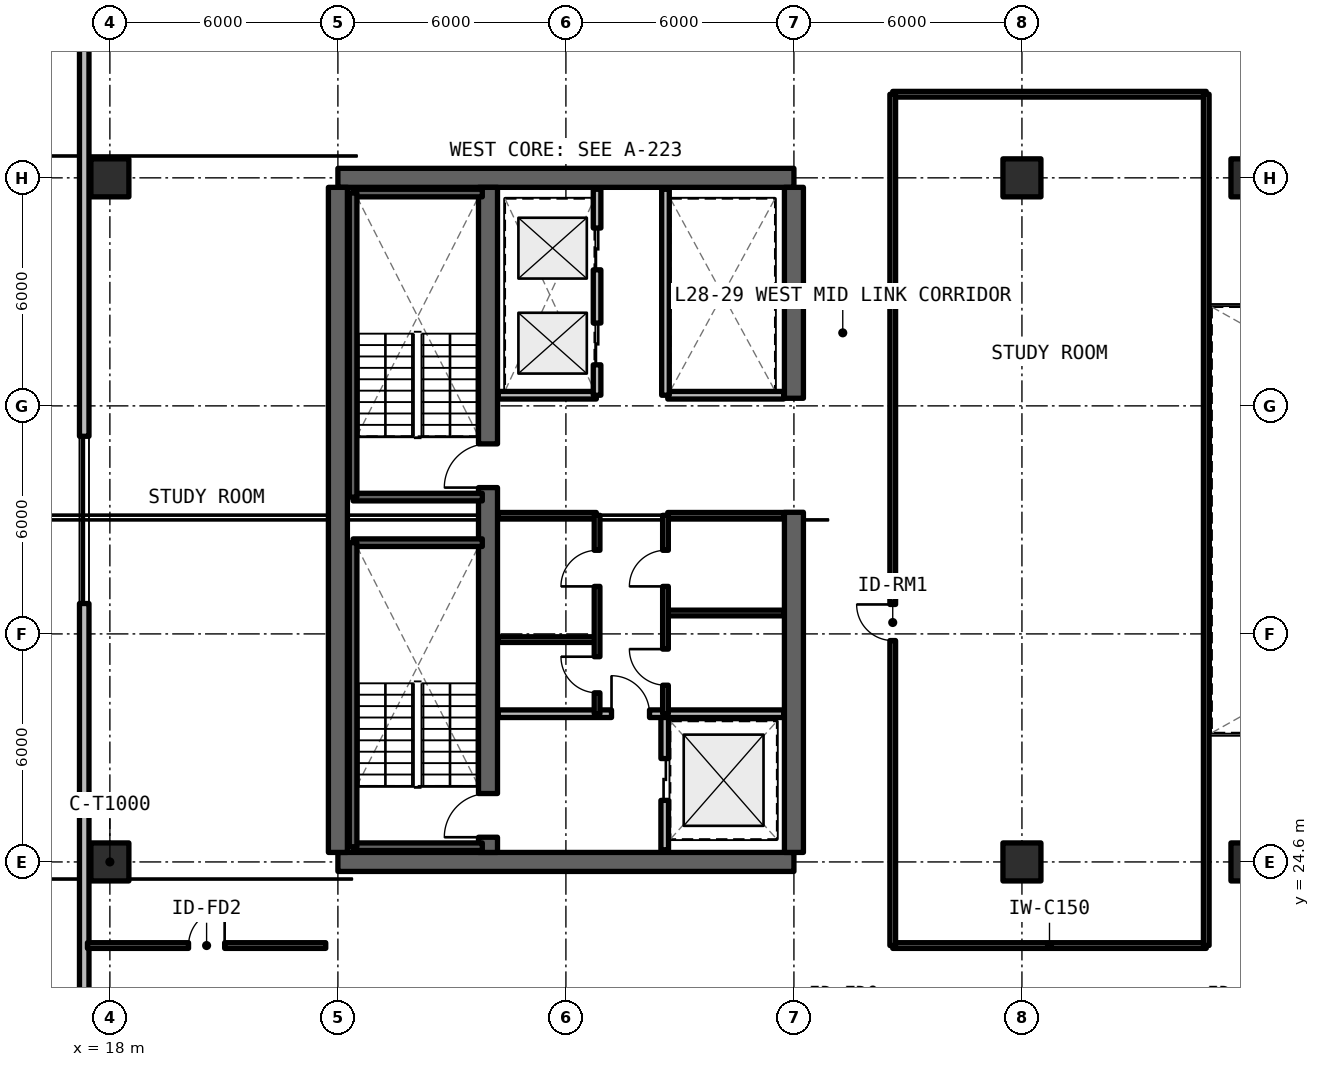
"""IFC4 building model, lengths in metres.
Left out: names, types, materials, properties, quantities, classifications, styles, units other than length and angle.
Written with IfcOpenShell. Run it as: python <this file> out.ifc"""

import sys

from ifc_helpers import new_model, si_unit, direction, frame, frame_2d, origin, origin_2d, place, context, subcontext, project, spatial, rectangle, extrude, element, fill, save


model = new_model("IFC4")
c1 = context("Model", 3, precision=1e-05, world=origin(), true_north=direction((0.0, 1.0)))
c2 = subcontext(c1, "Body", "Model", "MODEL_VIEW")
j1 = project(units=[si_unit("LENGTHUNIT", "METRE"), si_unit("PLANEANGLEUNIT", "RADIAN")], contexts=[c1])
p1 = place(None, origin())
s1 = spatial("IfcSite", under=j1, at=p1, CompositionType="ELEMENT")
p2 = place(p1, origin())
s2 = spatial("IfcBuilding", under=s1, at=p2, CompositionType="ELEMENT")
p3 = place(p2, frame((0.0, 0.0, 101.97)))
s3 = spatial("IfcBuildingStorey", under=s2, at=p3, CompositionType="ELEMENT", Elevation=101.97)
for number, where, z_axis, x_axis in (
    (1, (24.0, 24.6, 0.0), (0.0, 0.0, 1.0), (1.0, 0.0, 0.0)),
    (2, (36.0, 42.6, 0.0), (0.0, 0.0, 1.0), (-1.0, 0.0, 0.0)),
):
    element("IfcWall", number, at=place(p3, frame(where, z_axis=z_axis, x_axis=x_axis)), inside=s3, PredefinedType="SHEAR", context=c2, shape_type="SweptSolid", body=[
        extrude(rectangle(XDim=12.0, YDim=0.5, at=frame_2d((6.0, 0.0))), origin(), (0.0, 0.0, 1.0), 3.3),
    ])
p4 = place(p3, frame((24.0, 24.85, 0.0), z_axis=(0.0, 0.0, 1.0), x_axis=(0.0, 1.0, 0.0)))
e3 = element("IfcWall", 3, at=p4, inside=s3, PredefinedType="SHEAR", context=c2, shape_type="SweptSolid", body=[
    extrude(rectangle(XDim=17.5, YDim=0.5, at=frame_2d((8.75, 0.0))), origin(), (0.0, 0.0, 1.0), 3.3),
])
p5 = place(p3, frame((36.0, 24.85, 0.0), z_axis=(0.0, 0.0, 1.0), x_axis=(0.0, 1.0, 0.0)))
e4 = element("IfcWall", 4, at=p5, inside=s3, PredefinedType="SHEAR", context=c2, shape_type="SweptSolid", body=[
    extrude(rectangle(XDim=8.95, YDim=0.5, at=frame_2d((4.475, 0.0))), origin(), (0.0, 0.0, 1.0), 3.3),
])
p6 = place(p3, frame((36.0, 36.8, 0.0), z_axis=(0.0, 0.0, 1.0), x_axis=(0.0, 1.0, 0.0)))
e5 = element("IfcWall", 5, at=p6, inside=s3, PredefinedType="SHEAR", context=c2, shape_type="SweptSolid", body=[
    extrude(rectangle(XDim=5.55, YDim=0.5, at=frame_2d((2.775, 0.0))), origin(), (0.0, 0.0, 1.0), 3.3),
])
p7 = place(p3, frame((27.95, 24.85, 0.0), z_axis=(0.0, 0.0, 1.0), x_axis=(0.0, 1.0, 0.0)))
e6 = element("IfcWall", 6, at=p7, inside=s3, PredefinedType="SHEAR", context=c2, shape_type="SweptSolid", body=[
    extrude(rectangle(XDim=17.5, YDim=0.5, at=frame_2d((8.75, 0.0))), origin(), (0.0, 0.0, 1.0), 3.3),
])
p8 = place(p7, frame((0.4, 0.0, 0.0)))
e7 = element("IfcOpeningElement", 7, at=p8, cuts=e6, PredefinedType="OPENING", context=c2, shape_type="SweptSolid", body=[
    extrude(rectangle(XDim=1.15, YDim=2.15, at=frame_2d((0.575, 1.075))), frame((0.0, 0.26, 0.0), z_axis=(0.0, -1.0, 0.0), x_axis=(1.0, 0.0, 0.0)), (0.0, 0.0, 1.0), 0.52),
])
p9 = place(p7, frame((9.6, 0.0, 0.0)))
e8 = element("IfcOpeningElement", 8, at=p9, cuts=e6, PredefinedType="OPENING", context=c2, shape_type="SweptSolid", body=[
    extrude(rectangle(XDim=1.15, YDim=2.15, at=frame_2d((0.575, 1.075))), frame((0.0, 0.26, 0.0), z_axis=(0.0, -1.0, 0.0), x_axis=(1.0, 0.0, 0.0)), (0.0, 0.0, 1.0), 0.52),
])
for number, where, z_axis, x_axis in (
    (9, (18.0, 24.6, 0.0), (0.0, 0.0, 1.0), (1.0, 0.0, 0.0)),
    (10, (18.0, 42.6, 0.0), (0.0, 0.0, 1.0), (1.0, 0.0, 0.0)),
    (11, (42.0, 24.6, 0.0), (0.0, 0.0, 1.0), (1.0, 0.0, 0.0)),
    (12, (42.0, 42.6, 0.0), (0.0, 0.0, 1.0), (1.0, 0.0, 0.0)),
    (13, (48.0, 24.6, 0.0), (0.0, 0.0, 1.0), (1.0, 0.0, 0.0)),
    (14, (48.0, 42.6, 0.0), (0.0, 0.0, 1.0), (1.0, 0.0, 0.0)),
):
    element("IfcColumn", number, at=place(p3, frame(where, z_axis=z_axis, x_axis=x_axis)), inside=s3, PredefinedType="COLUMN", context=c2, shape_type="SweptSolid", body=[
        extrude(rectangle(XDim=1.0, YDim=1.0, at=origin_2d()), origin(), (0.0, 0.0, 1.0), 3.3),
    ])
p10 = place(p3, frame((17.325, 53.348, 0.0), z_axis=(0.0, 0.0, 1.0), x_axis=(0.0, -1.0, 0.0)))
e15 = element("IfcWall", 15, at=p10, inside=s3, PredefinedType="SOLIDWALL", context=c2, shape_type="SweptSolid", body=[
    extrude(rectangle(XDim=39.496, YDim=0.25, at=frame_2d((19.748, 0.0))), origin(), (0.0, 0.0, 1.0), 3.08),
])
p11 = place(p10, frame((36.448, 0.0, 0.0)))
e16 = element("IfcOpeningElement", 16, at=p11, cuts=e15, PredefinedType="OPENING", context=c2, shape_type="SweptSolid", body=[
    extrude(rectangle(XDim=1.1, YDim=2.15, at=frame_2d((0.55, 1.075))), frame((0.0, 0.135, 0.0), z_axis=(0.0, -1.0, 0.0), x_axis=(1.0, 0.0, 0.0)), (0.0, 0.0, 1.0), 0.27),
])
p12 = place(p10, frame((1.698, 0.0, 0.0)))
e17 = element("IfcOpeningElement", 17, at=p12, cuts=e15, PredefinedType="OPENING", context=c2, shape_type="SweptSolid", body=[
    extrude(rectangle(XDim=1.1, YDim=2.15, at=frame_2d((0.55, 1.075))), frame((0.0, 0.135, 0.0), z_axis=(0.0, -1.0, 0.0), x_axis=(1.0, 0.0, 0.0)), (0.0, 0.0, 1.0), 0.27),
])
p13 = place(p10, frame((17.548, 0.0, 0.78)))
e18 = element("IfcOpeningElement", 18, at=p13, cuts=e15, PredefinedType="OPENING", context=c2, shape_type="SweptSolid", body=[
    extrude(rectangle(XDim=4.4, YDim=1.66, at=frame_2d((2.2, 0.83))), frame((0.0, 0.135, 0.0), z_axis=(0.0, -1.0, 0.0), x_axis=(1.0, 0.0, 0.0)), (0.0, 0.0, 1.0), 0.27),
])
p14 = place(p3, frame((32.6, 24.92, 0.0), z_axis=(0.0, 0.0, 1.0), x_axis=(0.0, 1.0, 0.0)))
e19 = element("IfcWall", 19, at=p14, inside=s3, PredefinedType="SOLIDWALL", context=c2, shape_type="SweptSolid", body=[
    extrude(rectangle(XDim=3.58, YDim=0.2, at=frame_2d((1.79, 0.0))), origin(), (0.0, 0.0, 1.0), 2.35),
])
p15 = place(p14, frame((1.3, 0.0, 0.0)))
e20 = element("IfcOpeningElement", 20, at=p15, cuts=e19, PredefinedType="OPENING", context=c2, shape_type="SweptSolid", body=[
    extrude(rectangle(XDim=1.1, YDim=2.2, at=frame_2d((0.55, 1.1))), frame((0.0, 0.11, 0.0), z_axis=(0.0, -1.0, 0.0), x_axis=(1.0, 0.0, 0.0)), (0.0, 0.0, 1.0), 0.22),
])
p16 = place(p3, frame((28.22, 28.5, 0.0), z_axis=(0.0, 0.0, 1.0), x_axis=(1.0, 0.0, 0.0)))
e21 = element("IfcWall", 21, at=p16, inside=s3, PredefinedType="SOLIDWALL", context=c2, shape_type="SweptSolid", body=[
    extrude(rectangle(XDim=7.51, YDim=0.2, at=frame_2d((3.755, 0.0))), origin(), (0.0, 0.0, 1.0), 2.35),
])
p17 = place(p16, frame((2.98, 0.0, 0.0)))
e22 = element("IfcOpeningElement", 22, at=p17, cuts=e21, PredefinedType="OPENING", context=c2, shape_type="SweptSolid", body=[
    extrude(rectangle(XDim=1.0, YDim=2.15, at=frame_2d((0.5, 1.075))), frame((0.0, 0.11, 0.0), z_axis=(0.0, -1.0, 0.0), x_axis=(1.0, 0.0, 0.0)), (0.0, 0.0, 1.0), 0.22),
])
for number, where, z_axis, x_axis in (
    (23, (28.22, 30.45, 0.0), (0.0, 0.0, 1.0), (1.0, 0.0, 0.0)),
    (24, (28.22, 33.72, 0.0), (0.0, 0.0, 1.0), (1.0, 0.0, 0.0)),
):
    element("IfcWall", number, at=place(p3, frame(where, z_axis=z_axis, x_axis=x_axis)), inside=s3, PredefinedType="SOLIDWALL", context=c2, shape_type="SweptSolid", body=[
        extrude(rectangle(XDim=2.58, YDim=0.15, at=frame_2d((1.29, 0.0))), origin(), (0.0, 0.0, 1.0), 2.35),
    ])
p18 = place(p3, frame((30.82, 28.5, 0.0), z_axis=(0.0, 0.0, 1.0), x_axis=(0.0, 1.0, 0.0)))
e25 = element("IfcWall", 25, at=p18, inside=s3, PredefinedType="SOLIDWALL", context=c2, shape_type="SweptSolid", body=[
    extrude(rectangle(XDim=5.22, YDim=0.15, at=frame_2d((2.61, 0.0))), origin(), (0.0, 0.0, 1.0), 2.35),
])
p19 = place(p18, frame((0.55, 0.0, 0.0)))
e26 = element("IfcOpeningElement", 26, at=p19, cuts=e25, PredefinedType="OPENING", context=c2, shape_type="SweptSolid", body=[
    extrude(rectangle(XDim=0.95, YDim=2.15, at=frame_2d((0.475, 1.075))), frame((0.0, 0.085, 0.0), z_axis=(0.0, -1.0, 0.0), x_axis=(1.0, 0.0, 0.0)), (0.0, 0.0, 1.0), 0.17),
])
p20 = place(p18, frame((3.35, 0.0, 0.0)))
e27 = element("IfcOpeningElement", 27, at=p20, cuts=e25, PredefinedType="OPENING", context=c2, shape_type="SweptSolid", body=[
    extrude(rectangle(XDim=0.95, YDim=2.15, at=frame_2d((0.475, 1.075))), frame((0.0, 0.085, 0.0), z_axis=(0.0, -1.0, 0.0), x_axis=(1.0, 0.0, 0.0)), (0.0, 0.0, 1.0), 0.17),
])
for number, where, z_axis, x_axis in (
    (28, (32.68, 31.15, 0.0), (0.0, 0.0, 1.0), (1.0, 0.0, 0.0)),
    (29, (32.68, 33.72, 0.0), (0.0, 0.0, 1.0), (1.0, 0.0, 0.0)),
):
    element("IfcWall", number, at=place(p3, frame(where, z_axis=z_axis, x_axis=x_axis)), inside=s3, PredefinedType="SOLIDWALL", context=c2, shape_type="SweptSolid", body=[
        extrude(rectangle(XDim=3.05, YDim=0.15, at=frame_2d((1.525, 0.0))), origin(), (0.0, 0.0, 1.0), 2.35),
    ])
p21 = place(p3, frame((32.62, 28.5, 0.0), z_axis=(0.0, 0.0, 1.0), x_axis=(0.0, 1.0, 0.0)))
e30 = element("IfcWall", 30, at=p21, inside=s3, PredefinedType="SOLIDWALL", context=c2, shape_type="SweptSolid", body=[
    extrude(rectangle(XDim=5.22, YDim=0.15, at=frame_2d((2.61, 0.0))), origin(), (0.0, 0.0, 1.0), 2.35),
])
p22 = place(p21, frame((0.75, 0.0, 0.0)))
e31 = element("IfcOpeningElement", 31, at=p22, cuts=e30, PredefinedType="OPENING", context=c2, shape_type="SweptSolid", body=[
    extrude(rectangle(XDim=0.95, YDim=2.15, at=frame_2d((0.475, 1.075))), frame((0.0, 0.085, 0.0), z_axis=(0.0, -1.0, 0.0), x_axis=(1.0, 0.0, 0.0)), (0.0, 0.0, 1.0), 0.17),
])
p23 = place(p21, frame((3.35, 0.0, 0.0)))
e32 = element("IfcOpeningElement", 32, at=p23, cuts=e30, PredefinedType="OPENING", context=c2, shape_type="SweptSolid", body=[
    extrude(rectangle(XDim=0.95, YDim=2.15, at=frame_2d((0.475, 1.075))), frame((0.0, 0.085, 0.0), z_axis=(0.0, -1.0, 0.0), x_axis=(1.0, 0.0, 0.0)), (0.0, 0.0, 1.0), 0.17),
])
p24 = place(p3, frame((28.22, 36.88, 0.0), z_axis=(0.0, 0.0, 1.0), x_axis=(1.0, 0.0, 0.0)))
e33 = element("IfcWall", 33, at=p24, inside=s3, PredefinedType="SOLIDWALL", context=c2, shape_type="SweptSolid", body=[
    extrude(rectangle(XDim=2.58, YDim=0.2, at=frame_2d((1.29, 0.0))), origin(), (0.0, 0.0, 1.0), 2.35),
])
p25 = place(p3, frame((30.82, 36.88, 0.0), z_axis=(0.0, 0.0, 1.0), x_axis=(0.0, 1.0, 0.0)))
e34 = element("IfcWall", 34, at=p25, inside=s3, PredefinedType="SOLIDWALL", context=c2, shape_type="SweptSolid", body=[
    extrude(rectangle(XDim=5.42, YDim=0.2, at=frame_2d((2.71, 0.0))), origin(), (0.0, 0.0, 1.0), 2.35),
])
p26 = place(p25, frame((0.8, 0.0, 0.0)))
e35 = element("IfcOpeningElement", 35, at=p26, cuts=e34, PredefinedType="OPENING", context=c2, shape_type="SweptSolid", body=[
    extrude(rectangle(XDim=1.1, YDim=2.2, at=frame_2d((0.55, 1.1))), frame((0.0, 0.11, 0.0), z_axis=(0.0, -1.0, 0.0), x_axis=(1.0, 0.0, 0.0)), (0.0, 0.0, 1.0), 0.22),
])
p27 = place(p25, frame((3.3, 0.0, 0.0)))
e36 = element("IfcOpeningElement", 36, at=p27, cuts=e34, PredefinedType="OPENING", context=c2, shape_type="SweptSolid", body=[
    extrude(rectangle(XDim=1.1, YDim=2.2, at=frame_2d((0.55, 1.1))), frame((0.0, 0.11, 0.0), z_axis=(0.0, -1.0, 0.0), x_axis=(1.0, 0.0, 0.0)), (0.0, 0.0, 1.0), 0.22),
])
p28 = place(p3, frame((32.68, 36.88, 0.0), z_axis=(0.0, 0.0, 1.0), x_axis=(1.0, 0.0, 0.0)))
e37 = element("IfcWall", 37, at=p28, inside=s3, PredefinedType="SOLIDWALL", context=c2, shape_type="SweptSolid", body=[
    extrude(rectangle(XDim=3.05, YDim=0.2, at=frame_2d((1.525, 0.0))), origin(), (0.0, 0.0, 1.0), 2.35),
])
p29 = place(p3, frame((32.62, 36.88, 0.0), z_axis=(0.0, 0.0, 1.0), x_axis=(0.0, 1.0, 0.0)))
e38 = element("IfcWall", 38, at=p29, inside=s3, PredefinedType="SOLIDWALL", context=c2, shape_type="SweptSolid", body=[
    extrude(rectangle(XDim=5.42, YDim=0.2, at=frame_2d((2.71, 0.0))), origin(), (0.0, 0.0, 1.0), 2.35),
])
for number, where, z_axis, x_axis in (
    (39, (38.6, 22.4, 0.0), (0.0, 0.0, 1.0), (1.0, 0.0, 0.0)),
    (40, (38.6, 44.8, 0.0), (0.0, 0.0, 1.0), (1.0, 0.0, 0.0)),
):
    element("IfcWall", number, at=place(p3, frame(where, z_axis=z_axis, x_axis=x_axis)), inside=s3, PredefinedType="SOLIDWALL", context=c2, shape_type="SweptSolid", body=[
        extrude(rectangle(XDim=8.25, YDim=0.15, at=frame_2d((4.125, 0.0))), origin(), (0.0, 0.0, 1.0), 2.35),
    ])
p30 = place(p3, frame((38.6, 22.4, 0.0), z_axis=(0.0, 0.0, 1.0), x_axis=(0.0, 1.0, 0.0)))
e41 = element("IfcWall", 41, at=p30, inside=s3, PredefinedType="SOLIDWALL", context=c2, shape_type="SweptSolid", body=[
    extrude(rectangle(XDim=22.4, YDim=0.15, at=frame_2d((11.2, 0.0))), origin(), (0.0, 0.0, 1.0), 2.35),
])
p31 = place(p30, frame((8.025, 0.0, 0.0)))
e42 = element("IfcOpeningElement", 42, at=p31, cuts=e41, PredefinedType="OPENING", context=c2, shape_type="SweptSolid", body=[
    extrude(rectangle(XDim=0.95, YDim=2.15, at=frame_2d((0.475, 1.075))), frame((0.0, 0.085, 0.0), z_axis=(0.0, -1.0, 0.0), x_axis=(1.0, 0.0, 0.0)), (0.0, 0.0, 1.0), 0.17),
])
p32 = place(p3, frame((46.85, 22.4, 0.0), z_axis=(0.0, 0.0, 1.0), x_axis=(0.0, 1.0, 0.0)))
e43 = element("IfcWall", 43, at=p32, inside=s3, PredefinedType="SOLIDWALL", context=c2, shape_type="SweptSolid", body=[
    extrude(rectangle(XDim=22.4, YDim=0.15, at=frame_2d((11.2, 0.0))), origin(), (0.0, 0.0, 1.0), 2.35),
])
p33 = place(p3, frame((17.41, 22.4, 0.0), z_axis=(0.0, 0.0, 1.0), x_axis=(1.0, 0.0, 0.0)))
e44 = element("IfcWall", 44, at=p33, inside=s3, PredefinedType="SOLIDWALL", context=c2, shape_type="SweptSolid", body=[
    extrude(rectangle(XDim=6.27, YDim=0.15, at=frame_2d((3.135, 0.0))), origin(), (0.0, 0.0, 1.0), 2.35),
])
p34 = place(p33, frame((2.66, 0.0, 0.0)))
e45 = element("IfcOpeningElement", 45, at=p34, cuts=e44, PredefinedType="OPENING", context=c2, shape_type="SweptSolid", body=[
    extrude(rectangle(XDim=0.95, YDim=2.15, at=frame_2d((0.475, 1.075))), frame((0.0, 0.085, 0.0), z_axis=(0.0, -1.0, 0.0), x_axis=(1.0, 0.0, 0.0)), (0.0, 0.0, 1.0), 0.17),
])
for number, where, z_axis, x_axis in (
    (46, (24.4, 25.0, 0.0), (0.0, 0.0, 1.0), (1.0, 0.0, 0.0)),
    (47, (27.8, 33.0, 0.0), (0.0, 0.0, 1.0), (-1.0, 0.0, 0.0)),
):
    element("IfcWall", number, at=place(p3, frame(where, z_axis=z_axis, x_axis=x_axis)), inside=s3, PredefinedType="SOLIDWALL", context=c2, shape_type="SweptSolid", body=[
        extrude(rectangle(XDim=3.4, YDim=0.2, at=frame_2d((1.7, 0.0))), origin(), (0.0, 0.0, 1.0), 3.3),
    ])
p35 = place(p3, frame((24.4, 33.0, 0.0), z_axis=(0.0, 0.0, 1.0), x_axis=(0.0, -1.0, 0.0)))
e48 = element("IfcWall", 48, at=p35, inside=s3, PredefinedType="SOLIDWALL", context=c2, shape_type="SweptSolid", body=[
    extrude(rectangle(XDim=8.0, YDim=0.2, at=frame_2d((4.0, 0.0))), origin(), (0.0, 0.0, 1.0), 3.3),
])
for number, where, z_axis, x_axis in (
    (49, (24.4, 34.2, 0.0), (0.0, 0.0, 1.0), (1.0, 0.0, 0.0)),
    (50, (27.8, 42.2, 0.0), (0.0, 0.0, 1.0), (-1.0, 0.0, 0.0)),
):
    element("IfcWall", number, at=place(p3, frame(where, z_axis=z_axis, x_axis=x_axis)), inside=s3, PredefinedType="SOLIDWALL", context=c2, shape_type="SweptSolid", body=[
        extrude(rectangle(XDim=3.4, YDim=0.2, at=frame_2d((1.7, 0.0))), origin(), (0.0, 0.0, 1.0), 3.3),
    ])
p36 = place(p3, frame((24.4, 42.2, 0.0), z_axis=(0.0, 0.0, 1.0), x_axis=(0.0, -1.0, 0.0)))
e51 = element("IfcWall", 51, at=p36, inside=s3, PredefinedType="SOLIDWALL", context=c2, shape_type="SweptSolid", body=[
    extrude(rectangle(XDim=8.0, YDim=0.2, at=frame_2d((4.0, 0.0))), origin(), (0.0, 0.0, 1.0), 3.3),
])
p37 = place(p13, origin())
e52 = element("IfcWindow", 52, at=p37, inside=s3, PartitioningType="SINGLE_PANEL", PredefinedType="WINDOW", context=c2, shape_type="SweptSolid", body=[
    extrude(rectangle(XDim=4.4, YDim=1.66, at=frame_2d((2.2, 0.83))), frame((0.0, 0.03, 0.0), z_axis=(0.0, -1.0, 0.0), x_axis=(1.0, 0.0, 0.0)), (0.0, 0.0, 1.0), 0.06),
])
fill(e18, e52)
p38 = place(p15, origin())
e53 = element("IfcDoor", 53, at=p38, inside=s3, OperationType="SLIDING_TO_LEFT", PredefinedType="DOOR", context=c2, shape_type="SweptSolid", body=[
    extrude(rectangle(XDim=1.1, YDim=2.2, at=frame_2d((0.55, 1.1))), frame((0.0, 0.025, 0.0), z_axis=(0.0, -1.0, 0.0), x_axis=(1.0, 0.0, 0.0)), (0.0, 0.0, 1.0), 0.05),
])
fill(e20, e53)
p39 = place(p17, origin())
e54 = element("IfcDoor", 54, at=p39, inside=s3, OperationType="SINGLE_SWING_LEFT", PredefinedType="DOOR", context=c2, shape_type="SweptSolid", body=[
    extrude(rectangle(XDim=1.0, YDim=2.15, at=frame_2d((0.5, 1.075))), frame((0.0, 0.025, 0.0), z_axis=(0.0, -1.0, 0.0), x_axis=(1.0, 0.0, 0.0)), (0.0, 0.0, 1.0), 0.05),
])
fill(e22, e54)
p40 = place(p19, origin())
e55 = element("IfcDoor", 55, at=p40, inside=s3, OperationType="SINGLE_SWING_RIGHT", PredefinedType="DOOR", context=c2, shape_type="SweptSolid", body=[
    extrude(rectangle(XDim=0.95, YDim=2.15, at=frame_2d((0.475, 1.075))), frame((0.0, 0.025, 0.0), z_axis=(0.0, -1.0, 0.0), x_axis=(1.0, 0.0, 0.0)), (0.0, 0.0, 1.0), 0.05),
])
fill(e26, e55)
p41 = place(p20, origin())
e56 = element("IfcDoor", 56, at=p41, inside=s3, OperationType="SINGLE_SWING_LEFT", PredefinedType="DOOR", context=c2, shape_type="SweptSolid", body=[
    extrude(rectangle(XDim=0.95, YDim=2.15, at=frame_2d((0.475, 1.075))), frame((0.0, 0.025, 0.0), z_axis=(0.0, -1.0, 0.0), x_axis=(1.0, 0.0, 0.0)), (0.0, 0.0, 1.0), 0.05),
])
fill(e27, e56)
p42 = place(p22, origin())
e57 = element("IfcDoor", 57, at=p42, inside=s3, OperationType="SINGLE_SWING_RIGHT", PredefinedType="DOOR", context=c2, shape_type="SweptSolid", body=[
    extrude(rectangle(XDim=0.95, YDim=2.15, at=frame_2d((0.475, 1.075))), frame((0.0, 0.025, 0.0), z_axis=(0.0, -1.0, 0.0), x_axis=(1.0, 0.0, 0.0)), (0.0, 0.0, 1.0), 0.05),
])
fill(e31, e57)
p43 = place(p23, origin())
e58 = element("IfcDoor", 58, at=p43, inside=s3, OperationType="SINGLE_SWING_LEFT", PredefinedType="DOOR", context=c2, shape_type="SweptSolid", body=[
    extrude(rectangle(XDim=0.95, YDim=2.15, at=frame_2d((0.475, 1.075))), frame((0.0, 0.025, 0.0), z_axis=(0.0, -1.0, 0.0), x_axis=(1.0, 0.0, 0.0)), (0.0, 0.0, 1.0), 0.05),
])
fill(e32, e58)
p44 = place(p26, origin())
e59 = element("IfcDoor", 59, at=p44, inside=s3, OperationType="SLIDING_TO_LEFT", PredefinedType="DOOR", context=c2, shape_type="SweptSolid", body=[
    extrude(rectangle(XDim=1.1, YDim=2.2, at=frame_2d((0.55, 1.1))), frame((0.0, 0.025, 0.0), z_axis=(0.0, -1.0, 0.0), x_axis=(1.0, 0.0, 0.0)), (0.0, 0.0, 1.0), 0.05),
])
fill(e35, e59)
p45 = place(p27, origin())
e60 = element("IfcDoor", 60, at=p45, inside=s3, OperationType="SLIDING_TO_RIGHT", PredefinedType="DOOR", context=c2, shape_type="SweptSolid", body=[
    extrude(rectangle(XDim=1.1, YDim=2.2, at=frame_2d((0.55, 1.1))), frame((0.0, 0.025, 0.0), z_axis=(0.0, -1.0, 0.0), x_axis=(1.0, 0.0, 0.0)), (0.0, 0.0, 1.0), 0.05),
])
fill(e36, e60)
p46 = place(p31, origin())
e61 = element("IfcDoor", 61, at=p46, inside=s3, OperationType="SINGLE_SWING_RIGHT", PredefinedType="DOOR", context=c2, shape_type="SweptSolid", body=[
    extrude(rectangle(XDim=0.95, YDim=2.15, at=frame_2d((0.475, 1.075))), frame((0.0, 0.025, 0.0), z_axis=(0.0, -1.0, 0.0), x_axis=(1.0, 0.0, 0.0)), (0.0, 0.0, 1.0), 0.05),
])
fill(e42, e61)
p47 = place(p34, origin())
e62 = element("IfcDoor", 62, at=p47, inside=s3, OperationType="SINGLE_SWING_RIGHT", PredefinedType="DOOR", context=c2, shape_type="SweptSolid", body=[
    extrude(rectangle(XDim=0.95, YDim=2.15, at=frame_2d((0.475, 1.075))), frame((0.0, 0.025, 0.0), z_axis=(0.0, -1.0, 0.0), x_axis=(1.0, 0.0, 0.0)), (0.0, 0.0, 1.0), 0.05),
])
fill(e45, e62)
p48 = place(p8, origin())
e63 = element("IfcDoor", 63, at=p48, inside=s3, OperationType="SINGLE_SWING_LEFT", PredefinedType="DOOR", context=c2, shape_type="SweptSolid", body=[
    extrude(rectangle(XDim=1.15, YDim=2.15, at=frame_2d((0.575, 1.075))), frame((0.0, 0.025, 0.0), z_axis=(0.0, -1.0, 0.0), x_axis=(1.0, 0.0, 0.0)), (0.0, 0.0, 1.0), 0.05),
])
fill(e7, e63)
p49 = place(p9, origin())
e64 = element("IfcDoor", 64, at=p49, inside=s3, OperationType="SINGLE_SWING_RIGHT", PredefinedType="DOOR", context=c2, shape_type="SweptSolid", body=[
    extrude(rectangle(XDim=1.15, YDim=2.15, at=frame_2d((0.575, 1.075))), frame((0.0, 0.025, 0.0), z_axis=(0.0, -1.0, 0.0), x_axis=(1.0, 0.0, 0.0)), (0.0, 0.0, 1.0), 0.05),
])
fill(e8, e64)
save(model, sys.argv[1])
